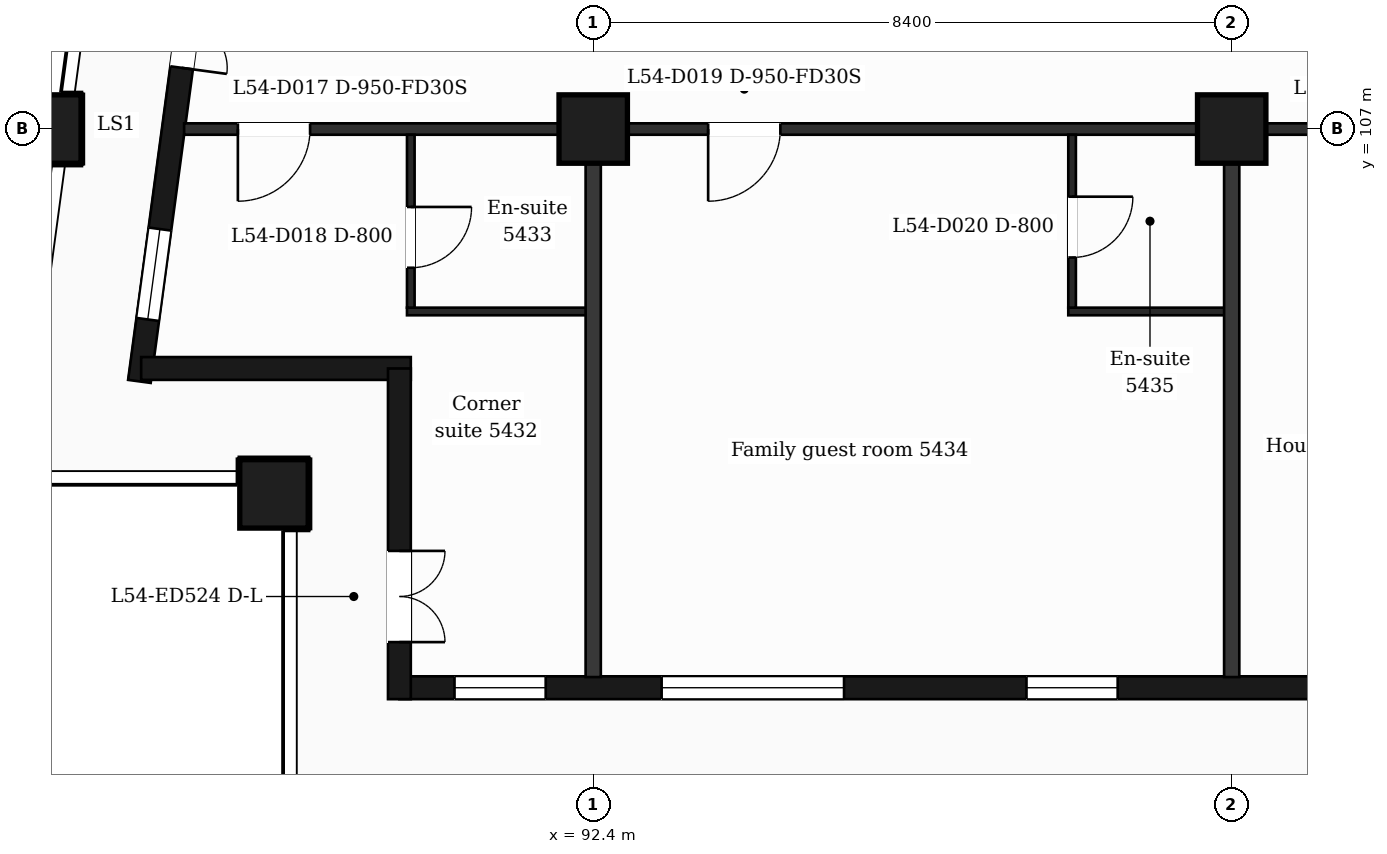
"""IFC4 building model, lengths in metres.
Left out: names, types, materials, properties, quantities, classifications, styles, units other than length and angle.
Written with IfcOpenShell. Run it as: python <this file> out.ifc"""

import sys

from ifc_helpers import new_model, si_unit, direction, frame, frame_2d, origin, origin_2d, place, context, subcontext, project, spatial, rectangle, extrude, element, fill, save


model = new_model("IFC4")
c1 = context("Model", 3, precision=1e-05, world=origin(), true_north=direction((0.0, 1.0)))
c2 = subcontext(c1, "Body", "Model", "MODEL_VIEW")
j1 = project(units=[si_unit("LENGTHUNIT", "METRE"), si_unit("PLANEANGLEUNIT", "RADIAN")], contexts=[c1])
p1 = place(None, origin())
s1 = spatial("IfcSite", under=j1, at=p1, CompositionType="ELEMENT")
p2 = place(p1, origin())
s2 = spatial("IfcBuilding", under=s1, at=p2, CompositionType="ELEMENT")
p3 = place(p2, frame((0.0, 0.0, 224.4)))
s3 = spatial("IfcBuildingStorey", under=s2, at=p3, CompositionType="ELEMENT", Elevation=224.4)
for number, where, z_axis, x_axis in (
    (1, (88.2, 102.2, 0.0), (0.0, 0.0, 1.0), (1.0, 0.0, 0.0)),
    (2, (92.4, 107.0, 0.0), (0.0, 0.0, 1.0), (1.0, 0.0, 0.0)),
    (3, (100.8, 107.0, 0.0), (0.0, 0.0, 1.0), (1.0, 0.0, 0.0)),
    (4, (85.211, 107.0, 0.0), (0.0, 0.0, 1.0), (1.0, 0.0, 0.0)),
):
    element("IfcColumn", number, at=place(p3, frame(where, z_axis=z_axis, x_axis=x_axis)), inside=s3, PredefinedType="COLUMN", context=c2, shape_type="SweptSolid", body=[
        extrude(rectangle(XDim=0.9, YDim=0.9, at=origin_2d()), origin(), (0.0, 0.0, 1.0), 3.7),
    ])
p4 = place(p3, frame((89.85, 99.65, 0.0), z_axis=(0.0, 0.0, 1.0), x_axis=(1.0, 0.0, 0.0)))
e5 = element("IfcWall", 5, at=p4, inside=s3, PredefinedType="SOLIDWALL", context=c2, shape_type="SweptSolid", body=[
    extrude(rectangle(XDim=47.25, YDim=0.3, at=frame_2d((23.625, 0.0))), origin(), (0.0, 0.0, 1.0), 3.38),
])
p5 = place(p4, frame((0.725, 0.0, 0.9)))
e6 = element("IfcOpeningElement", 6, at=p5, cuts=e5, PredefinedType="OPENING", context=c2, shape_type="SweptSolid", body=[
    extrude(rectangle(XDim=1.2, YDim=2.1, at=frame_2d((0.6, 1.05))), frame((0.0, 0.16, 0.0), z_axis=(0.0, -1.0, 0.0), x_axis=(1.0, 0.0, 0.0)), (0.0, 0.0, 1.0), 0.32),
])
p6 = place(p4, frame((3.45, 0.0, 0.9)))
e7 = element("IfcOpeningElement", 7, at=p6, cuts=e5, PredefinedType="OPENING", context=c2, shape_type="SweptSolid", body=[
    extrude(rectangle(XDim=2.4, YDim=2.1, at=frame_2d((1.2, 1.05))), frame((0.0, 0.16, 0.0), z_axis=(0.0, -1.0, 0.0), x_axis=(1.0, 0.0, 0.0)), (0.0, 0.0, 1.0), 0.32),
])
p7 = place(p4, frame((8.25, 0.0, 0.9)))
e8 = element("IfcOpeningElement", 8, at=p7, cuts=e5, PredefinedType="OPENING", context=c2, shape_type="SweptSolid", body=[
    extrude(rectangle(XDim=1.2, YDim=2.1, at=frame_2d((0.6, 1.05))), frame((0.0, 0.16, 0.0), z_axis=(0.0, -1.0, 0.0), x_axis=(1.0, 0.0, 0.0)), (0.0, 0.0, 1.0), 0.32),
])
p8 = place(p4, frame((12.45, 0.0, 0.9)))
e9 = element("IfcOpeningElement", 9, at=p8, cuts=e5, PredefinedType="OPENING", context=c2, shape_type="SweptSolid", body=[
    extrude(rectangle(XDim=1.2, YDim=2.1, at=frame_2d((0.6, 1.05))), frame((0.0, 0.16, 0.0), z_axis=(0.0, -1.0, 0.0), x_axis=(1.0, 0.0, 0.0)), (0.0, 0.0, 1.0), 0.32),
])
p9 = place(p4, frame((16.05, 0.0, 0.9)))
e10 = element("IfcOpeningElement", 10, at=p9, cuts=e5, PredefinedType="OPENING", context=c2, shape_type="SweptSolid", body=[
    extrude(rectangle(XDim=2.4, YDim=2.1, at=frame_2d((1.2, 1.05))), frame((0.0, 0.16, 0.0), z_axis=(0.0, -1.0, 0.0), x_axis=(1.0, 0.0, 0.0)), (0.0, 0.0, 1.0), 0.32),
])
p10 = place(p4, frame((20.25, 0.0, 0.9)))
e11 = element("IfcOpeningElement", 11, at=p10, cuts=e5, PredefinedType="OPENING", context=c2, shape_type="SweptSolid", body=[
    extrude(rectangle(XDim=2.4, YDim=2.1, at=frame_2d((1.2, 1.05))), frame((0.0, 0.16, 0.0), z_axis=(0.0, -1.0, 0.0), x_axis=(1.0, 0.0, 0.0)), (0.0, 0.0, 1.0), 0.32),
])
p11 = place(p4, frame((25.05, 0.0, 0.0)))
e12 = element("IfcOpeningElement", 12, at=p11, cuts=e5, PredefinedType="OPENING", context=c2, shape_type="SweptSolid", body=[
    extrude(rectangle(XDim=1.2, YDim=2.4, at=frame_2d((0.6, 1.2))), frame((0.0, 0.16, 0.0), z_axis=(0.0, -1.0, 0.0), x_axis=(1.0, 0.0, 0.0)), (0.0, 0.0, 1.0), 0.32),
])
p12 = place(p4, frame((28.65, 0.0, 0.9)))
e13 = element("IfcOpeningElement", 13, at=p12, cuts=e5, PredefinedType="OPENING", context=c2, shape_type="SweptSolid", body=[
    extrude(rectangle(XDim=2.4, YDim=2.1, at=frame_2d((1.2, 1.05))), frame((0.0, 0.16, 0.0), z_axis=(0.0, -1.0, 0.0), x_axis=(1.0, 0.0, 0.0)), (0.0, 0.0, 1.0), 0.32),
])
p13 = place(p4, frame((32.85, 0.0, 0.9)))
e14 = element("IfcOpeningElement", 14, at=p13, cuts=e5, PredefinedType="OPENING", context=c2, shape_type="SweptSolid", body=[
    extrude(rectangle(XDim=2.4, YDim=2.1, at=frame_2d((1.2, 1.05))), frame((0.0, 0.16, 0.0), z_axis=(0.0, -1.0, 0.0), x_axis=(1.0, 0.0, 0.0)), (0.0, 0.0, 1.0), 0.32),
])
p14 = place(p4, frame((37.65, 0.0, 0.9)))
e15 = element("IfcOpeningElement", 15, at=p14, cuts=e5, PredefinedType="OPENING", context=c2, shape_type="SweptSolid", body=[
    extrude(rectangle(XDim=1.2, YDim=2.1, at=frame_2d((0.6, 1.05))), frame((0.0, 0.16, 0.0), z_axis=(0.0, -1.0, 0.0), x_axis=(1.0, 0.0, 0.0)), (0.0, 0.0, 1.0), 0.32),
])
p15 = place(p4, frame((41.85, 0.0, 0.9)))
e16 = element("IfcOpeningElement", 16, at=p15, cuts=e5, PredefinedType="OPENING", context=c2, shape_type="SweptSolid", body=[
    extrude(rectangle(XDim=1.2, YDim=2.1, at=frame_2d((0.6, 1.05))), frame((0.0, 0.16, 0.0), z_axis=(0.0, -1.0, 0.0), x_axis=(1.0, 0.0, 0.0)), (0.0, 0.0, 1.0), 0.32),
])
p16 = place(p4, frame((45.25, 0.0, 0.9)))
e17 = element("IfcOpeningElement", 17, at=p16, cuts=e5, PredefinedType="OPENING", context=c2, shape_type="SweptSolid", body=[
    extrude(rectangle(XDim=1.2, YDim=2.1, at=frame_2d((0.6, 1.05))), frame((0.0, 0.16, 0.0), z_axis=(0.0, -1.0, 0.0), x_axis=(1.0, 0.0, 0.0)), (0.0, 0.0, 1.0), 0.32),
])
p17 = place(p3, frame((87.334, 110.4, 0.0), z_axis=(0.0, 0.0, 1.0), x_axis=(-0.133437175554, -0.991057273915, 0.0)))
e18 = element("IfcWall", 18, at=p17, inside=s3, PredefinedType="SOLIDWALL", context=c2, shape_type="SweptSolid", body=[
    extrude(rectangle(XDim=6.781, YDim=0.3, at=frame_2d((3.39, 0.0))), origin(), (0.0, 0.0, 1.0), 3.38),
])
p18 = place(p17, frame((1.418, 0.0, 0.0)))
e19 = element("IfcOpeningElement", 19, at=p18, cuts=e18, PredefinedType="OPENING", context=c2, shape_type="SweptSolid", body=[
    extrude(rectangle(XDim=1.2, YDim=2.4, at=frame_2d((0.6, 1.2))), frame((0.0, 0.16, 0.0), z_axis=(0.0, -1.0, 0.0), x_axis=(1.0, 0.0, 0.0)), (0.0, 0.0, 1.0), 0.32),
])
p19 = place(p17, frame((4.758, 0.0, 0.9)))
e20 = element("IfcOpeningElement", 20, at=p19, cuts=e18, PredefinedType="OPENING", context=c2, shape_type="SweptSolid", body=[
    extrude(rectangle(XDim=1.2, YDim=2.1, at=frame_2d((0.6, 1.05))), frame((0.0, 0.16, 0.0), z_axis=(0.0, -1.0, 0.0), x_axis=(1.0, 0.0, 0.0)), (0.0, 0.0, 1.0), 0.32),
])
p20 = place(p3, frame((86.452, 103.85, 0.0), z_axis=(0.0, 0.0, 1.0), x_axis=(1.0, 0.0, 0.0)))
e21 = element("IfcWall", 21, at=p20, inside=s3, PredefinedType="SOLIDWALL", context=c2, shape_type="SweptSolid", body=[
    extrude(rectangle(XDim=3.548, YDim=0.3, at=frame_2d((1.774, 0.0))), origin(), (0.0, 0.0, 1.0), 3.38),
])
p21 = place(p3, frame((89.85, 103.85, 0.0), z_axis=(0.0, 0.0, 1.0), x_axis=(0.0, -1.0, 0.0)))
e22 = element("IfcWall", 22, at=p21, inside=s3, PredefinedType="SOLIDWALL", context=c2, shape_type="SweptSolid", body=[
    extrude(rectangle(XDim=4.35, YDim=0.3, at=frame_2d((2.175, 0.0))), origin(), (0.0, 0.0, 1.0), 3.38),
])
p22 = place(p21, frame((2.4, 0.0, 0.0)))
e23 = element("IfcOpeningElement", 23, at=p22, cuts=e22, PredefinedType="OPENING", context=c2, shape_type="SweptSolid", body=[
    extrude(rectangle(XDim=1.2, YDim=2.4, at=frame_2d((0.6, 1.2))), frame((0.0, 0.16, 0.0), z_axis=(0.0, -1.0, 0.0), x_axis=(1.0, 0.0, 0.0)), (0.0, 0.0, 1.0), 0.32),
])
p23 = place(p3, frame((89.95, 104.6, 0.0), z_axis=(0.0, 0.0, 1.0), x_axis=(1.0, 0.0, 0.0)))
e24 = element("IfcWall", 24, at=p23, inside=s3, PredefinedType="PARTITIONING", context=c2, shape_type="SweptSolid", body=[
    extrude(rectangle(XDim=2.45, YDim=0.1, at=frame_2d((1.225, 0.0))), origin(), (0.0, 0.0, 1.0), 3.38),
])
p24 = place(p3, frame((98.65, 104.6, 0.0), z_axis=(0.0, 0.0, 1.0), x_axis=(1.0, 0.0, 0.0)))
e25 = element("IfcWall", 25, at=p24, inside=s3, PredefinedType="PARTITIONING", context=c2, shape_type="SweptSolid", body=[
    extrude(rectangle(XDim=2.15, YDim=0.1, at=frame_2d((1.075, 0.0))), origin(), (0.0, 0.0, 1.0), 3.38),
])
p25 = place(p3, frame((87.018, 107.0, 0.0), z_axis=(0.0, 0.0, 1.0), x_axis=(1.0, 0.0, 0.0)))
e26 = element("IfcWall", 26, at=p25, inside=s3, PredefinedType="PARTITIONING", context=c2, shape_type="SweptSolid", body=[
    extrude(rectangle(XDim=52.765, YDim=0.15, at=frame_2d((26.382, 0.0))), origin(), (0.0, 0.0, 1.0), 3.38),
])
p26 = place(p25, frame((0.707, 0.0, 0.0)))
e27 = element("IfcOpeningElement", 27, at=p26, cuts=e26, PredefinedType="OPENING", context=c2, shape_type="SweptSolid", body=[
    extrude(rectangle(XDim=0.95, YDim=2.1, at=frame_2d((0.475, 1.05))), frame((0.0, 0.085, 0.0), z_axis=(0.0, -1.0, 0.0), x_axis=(1.0, 0.0, 0.0)), (0.0, 0.0, 1.0), 0.17),
])
p27 = place(p25, frame((6.894, 0.0, 0.0)))
e28 = element("IfcOpeningElement", 28, at=p27, cuts=e26, PredefinedType="OPENING", context=c2, shape_type="SweptSolid", body=[
    extrude(rectangle(XDim=0.95, YDim=2.1, at=frame_2d((0.475, 1.05))), frame((0.0, 0.085, 0.0), z_axis=(0.0, -1.0, 0.0), x_axis=(1.0, 0.0, 0.0)), (0.0, 0.0, 1.0), 0.17),
])
p28 = place(p25, frame((15.662, 0.0, 0.0)))
e29 = element("IfcOpeningElement", 29, at=p28, cuts=e26, PredefinedType="OPENING", context=c2, shape_type="SweptSolid", body=[
    extrude(rectangle(XDim=0.95, YDim=2.1, at=frame_2d((0.475, 1.05))), frame((0.0, 0.085, 0.0), z_axis=(0.0, -1.0, 0.0), x_axis=(1.0, 0.0, 0.0)), (0.0, 0.0, 1.0), 0.17),
])
p29 = place(p25, frame((18.257, 0.0, 0.0)))
e30 = element("IfcOpeningElement", 30, at=p29, cuts=e26, PredefinedType="OPENING", context=c2, shape_type="SweptSolid", body=[
    extrude(rectangle(XDim=0.95, YDim=2.1, at=frame_2d((0.475, 1.05))), frame((0.0, 0.085, 0.0), z_axis=(0.0, -1.0, 0.0), x_axis=(1.0, 0.0, 0.0)), (0.0, 0.0, 1.0), 0.17),
])
p30 = place(p25, frame((28.607, 0.0, 0.0)))
e31 = element("IfcOpeningElement", 31, at=p30, cuts=e26, PredefinedType="OPENING", context=c2, shape_type="SweptSolid", body=[
    extrude(rectangle(XDim=1.0, YDim=2.1, at=frame_2d((0.5, 1.05))), frame((0.0, 0.085, 0.0), z_axis=(0.0, -1.0, 0.0), x_axis=(1.0, 0.0, 0.0)), (0.0, 0.0, 1.0), 0.17),
])
p31 = place(p25, frame((31.302, 0.0, 0.0)))
e32 = element("IfcOpeningElement", 32, at=p31, cuts=e26, PredefinedType="OPENING", context=c2, shape_type="SweptSolid", body=[
    extrude(rectangle(XDim=0.95, YDim=2.1, at=frame_2d((0.475, 1.05))), frame((0.0, 0.085, 0.0), z_axis=(0.0, -1.0, 0.0), x_axis=(1.0, 0.0, 0.0)), (0.0, 0.0, 1.0), 0.17),
])
p32 = place(p25, frame((35.057, 0.0, 0.0)))
e33 = element("IfcOpeningElement", 33, at=p32, cuts=e26, PredefinedType="OPENING", context=c2, shape_type="SweptSolid", body=[
    extrude(rectangle(XDim=0.95, YDim=2.1, at=frame_2d((0.475, 1.05))), frame((0.0, 0.085, 0.0), z_axis=(0.0, -1.0, 0.0), x_axis=(1.0, 0.0, 0.0)), (0.0, 0.0, 1.0), 0.17),
])
p33 = place(p25, frame((41.957, 0.0, 0.0)))
e34 = element("IfcOpeningElement", 34, at=p33, cuts=e26, PredefinedType="OPENING", context=c2, shape_type="SweptSolid", body=[
    extrude(rectangle(XDim=0.95, YDim=2.1, at=frame_2d((0.475, 1.05))), frame((0.0, 0.085, 0.0), z_axis=(0.0, -1.0, 0.0), x_axis=(1.0, 0.0, 0.0)), (0.0, 0.0, 1.0), 0.17),
])
p34 = place(p25, frame((45.712, 0.0, 0.0)))
e35 = element("IfcOpeningElement", 35, at=p34, cuts=e26, PredefinedType="OPENING", context=c2, shape_type="SweptSolid", body=[
    extrude(rectangle(XDim=1.0, YDim=2.1, at=frame_2d((0.5, 1.05))), frame((0.0, 0.085, 0.0), z_axis=(0.0, -1.0, 0.0), x_axis=(1.0, 0.0, 0.0)), (0.0, 0.0, 1.0), 0.17),
])
p35 = place(p25, frame((48.974, 0.0, 0.0)))
e36 = element("IfcOpeningElement", 36, at=p35, cuts=e26, PredefinedType="OPENING", context=c2, shape_type="SweptSolid", body=[
    extrude(rectangle(XDim=0.95, YDim=2.1, at=frame_2d((0.475, 1.05))), frame((0.0, 0.085, 0.0), z_axis=(0.0, -1.0, 0.0), x_axis=(1.0, 0.0, 0.0)), (0.0, 0.0, 1.0), 0.17),
])
p36 = place(p3, frame((90.0, 104.65, 0.0), z_axis=(0.0, 0.0, 1.0), x_axis=(0.0, 1.0, 0.0)))
e37 = element("IfcWall", 37, at=p36, inside=s3, PredefinedType="PARTITIONING", context=c2, shape_type="SweptSolid", body=[
    extrude(rectangle(XDim=2.275, YDim=0.1, at=frame_2d((1.138, 0.0))), origin(), (0.0, 0.0, 1.0), 3.38),
])
p37 = place(p36, frame((0.525, 0.0, 0.0)))
e38 = element("IfcOpeningElement", 38, at=p37, cuts=e37, PredefinedType="OPENING", context=c2, shape_type="SweptSolid", body=[
    extrude(rectangle(XDim=0.8, YDim=2.1, at=frame_2d((0.4, 1.05))), frame((0.0, 0.06, 0.0), z_axis=(0.0, -1.0, 0.0), x_axis=(1.0, 0.0, 0.0)), (0.0, 0.0, 1.0), 0.12),
])
p38 = place(p3, frame((92.4, 99.79, 0.0), z_axis=(0.0, 0.0, 1.0), x_axis=(0.0, 1.0, 0.0)))
e39 = element("IfcWall", 39, at=p38, inside=s3, PredefinedType="PARTITIONING", context=c2, shape_type="SweptSolid", body=[
    extrude(rectangle(XDim=7.135, YDim=0.2, at=frame_2d((3.567, 0.0))), origin(), (0.0, 0.0, 1.0), 3.38),
])
p39 = place(p3, frame((98.7, 104.65, 0.0), z_axis=(0.0, 0.0, 1.0), x_axis=(0.0, 1.0, 0.0)))
e40 = element("IfcWall", 40, at=p39, inside=s3, PredefinedType="PARTITIONING", context=c2, shape_type="SweptSolid", body=[
    extrude(rectangle(XDim=2.275, YDim=0.1, at=frame_2d((1.138, 0.0))), origin(), (0.0, 0.0, 1.0), 3.38),
])
p40 = place(p39, frame((0.66, 0.0, 0.0)))
e41 = element("IfcOpeningElement", 41, at=p40, cuts=e40, PredefinedType="OPENING", context=c2, shape_type="SweptSolid", body=[
    extrude(rectangle(XDim=0.8, YDim=2.1, at=frame_2d((0.4, 1.05))), frame((0.0, 0.06, 0.0), z_axis=(0.0, -1.0, 0.0), x_axis=(1.0, 0.0, 0.0)), (0.0, 0.0, 1.0), 0.12),
])
p41 = place(p3, frame((100.8, 99.79, 0.0), z_axis=(0.0, 0.0, 1.0), x_axis=(0.0, 1.0, 0.0)))
e42 = element("IfcWall", 42, at=p41, inside=s3, PredefinedType="PARTITIONING", context=c2, shape_type="SweptSolid", body=[
    extrude(rectangle(XDim=7.135, YDim=0.2, at=frame_2d((3.567, 0.0))), origin(), (0.0, 0.0, 1.0), 3.38),
])
p42 = place(p5, origin())
e43 = element("IfcWindow", 43, at=p42, inside=s3, PartitioningType="SINGLE_PANEL", PredefinedType="WINDOW", context=c2, shape_type="SweptSolid", body=[
    extrude(rectangle(XDim=1.2, YDim=2.1, at=frame_2d((0.6, 1.05))), frame((0.0, 0.03, 0.0), z_axis=(0.0, -1.0, 0.0), x_axis=(1.0, 0.0, 0.0)), (0.0, 0.0, 1.0), 0.06),
])
fill(e6, e43)
p43 = place(p6, origin())
e44 = element("IfcWindow", 44, at=p43, inside=s3, PartitioningType="SINGLE_PANEL", PredefinedType="WINDOW", context=c2, shape_type="SweptSolid", body=[
    extrude(rectangle(XDim=2.4, YDim=2.1, at=frame_2d((1.2, 1.05))), frame((0.0, 0.03, 0.0), z_axis=(0.0, -1.0, 0.0), x_axis=(1.0, 0.0, 0.0)), (0.0, 0.0, 1.0), 0.06),
])
fill(e7, e44)
p44 = place(p7, origin())
e45 = element("IfcWindow", 45, at=p44, inside=s3, PartitioningType="SINGLE_PANEL", PredefinedType="WINDOW", context=c2, shape_type="SweptSolid", body=[
    extrude(rectangle(XDim=1.2, YDim=2.1, at=frame_2d((0.6, 1.05))), frame((0.0, 0.03, 0.0), z_axis=(0.0, -1.0, 0.0), x_axis=(1.0, 0.0, 0.0)), (0.0, 0.0, 1.0), 0.06),
])
fill(e8, e45)
p45 = place(p18, origin())
e46 = element("IfcDoor", 46, at=p45, inside=s3, OperationType="DOUBLE_DOOR_SINGLE_SWING", PredefinedType="DOOR", context=c2, shape_type="SweptSolid", body=[
    extrude(rectangle(XDim=1.2, YDim=2.4, at=frame_2d((0.6, 1.2))), frame((0.0, 0.025, 0.0), z_axis=(0.0, -1.0, 0.0), x_axis=(1.0, 0.0, 0.0)), (0.0, 0.0, 1.0), 0.05),
])
fill(e19, e46)
p46 = place(p19, origin())
e47 = element("IfcWindow", 47, at=p46, inside=s3, PartitioningType="SINGLE_PANEL", PredefinedType="WINDOW", context=c2, shape_type="SweptSolid", body=[
    extrude(rectangle(XDim=1.2, YDim=2.1, at=frame_2d((0.6, 1.05))), frame((0.0, 0.03, 0.0), z_axis=(0.0, -1.0, 0.0), x_axis=(1.0, 0.0, 0.0)), (0.0, 0.0, 1.0), 0.06),
])
fill(e20, e47)
p47 = place(p22, origin())
e48 = element("IfcDoor", 48, at=p47, inside=s3, OperationType="DOUBLE_DOOR_SINGLE_SWING", PredefinedType="DOOR", context=c2, shape_type="SweptSolid", body=[
    extrude(rectangle(XDim=1.2, YDim=2.4, at=frame_2d((0.6, 1.2))), frame((0.0, 0.025, 0.0), z_axis=(0.0, -1.0, 0.0), x_axis=(1.0, 0.0, 0.0)), (0.0, 0.0, 1.0), 0.05),
])
fill(e23, e48)
p48 = place(p26, origin())
e49 = element("IfcDoor", 49, at=p48, inside=s3, OperationType="SINGLE_SWING_LEFT", PredefinedType="DOOR", context=c2, shape_type="SweptSolid", body=[
    extrude(rectangle(XDim=0.95, YDim=2.1, at=frame_2d((0.475, 1.05))), frame((0.0, 0.025, 0.0), z_axis=(0.0, -1.0, 0.0), x_axis=(1.0, 0.0, 0.0)), (0.0, 0.0, 1.0), 0.05),
])
fill(e27, e49)
p49 = place(p37, origin())
e50 = element("IfcDoor", 50, at=p49, inside=s3, OperationType="SINGLE_SWING_RIGHT", PredefinedType="DOOR", context=c2, shape_type="SweptSolid", body=[
    extrude(rectangle(XDim=0.8, YDim=2.1, at=frame_2d((0.4, 1.05))), frame((0.0, 0.025, 0.0), z_axis=(0.0, -1.0, 0.0), x_axis=(1.0, 0.0, 0.0)), (0.0, 0.0, 1.0), 0.05),
])
fill(e38, e50)
p50 = place(p27, origin())
e51 = element("IfcDoor", 51, at=p50, inside=s3, OperationType="SINGLE_SWING_LEFT", PredefinedType="DOOR", context=c2, shape_type="SweptSolid", body=[
    extrude(rectangle(XDim=0.95, YDim=2.1, at=frame_2d((0.475, 1.05))), frame((0.0, 0.025, 0.0), z_axis=(0.0, -1.0, 0.0), x_axis=(1.0, 0.0, 0.0)), (0.0, 0.0, 1.0), 0.05),
])
fill(e28, e51)
p51 = place(p40, origin())
e52 = element("IfcDoor", 52, at=p51, inside=s3, OperationType="SINGLE_SWING_RIGHT", PredefinedType="DOOR", context=c2, shape_type="SweptSolid", body=[
    extrude(rectangle(XDim=0.8, YDim=2.1, at=frame_2d((0.4, 1.05))), frame((0.0, 0.025, 0.0), z_axis=(0.0, -1.0, 0.0), x_axis=(1.0, 0.0, 0.0)), (0.0, 0.0, 1.0), 0.05),
])
fill(e41, e52)
save(model, sys.argv[1])
